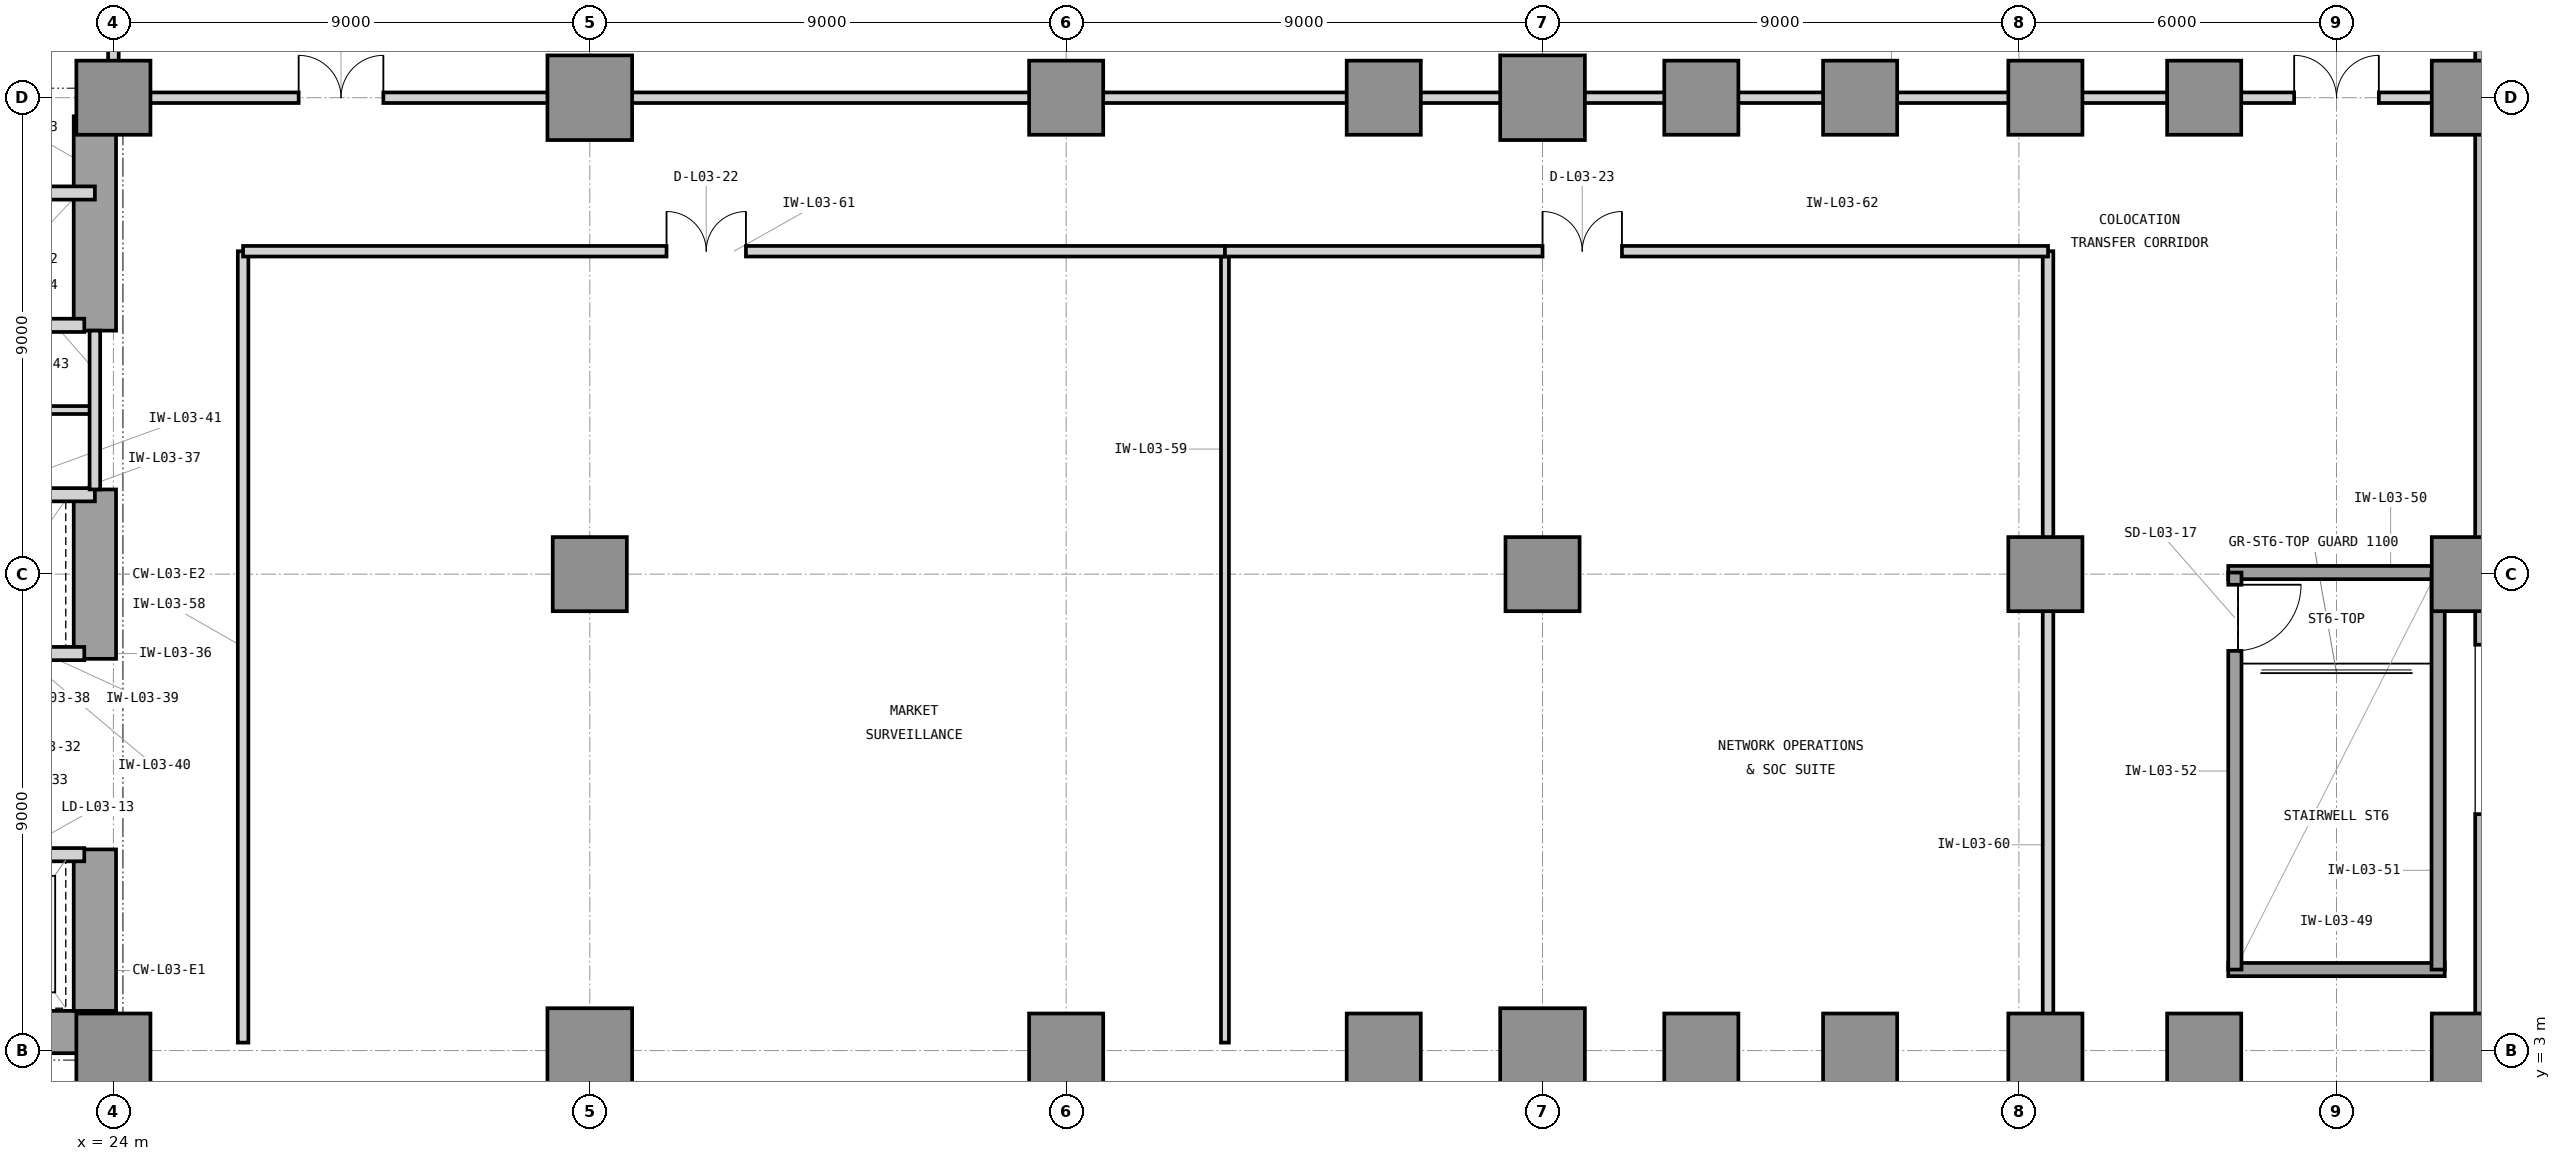
"""IFC4 building model, lengths in metres.
Left out: names, types, materials, properties, quantities, classifications, styles, units other than length and angle.
Written with IfcOpenShell. Run it as: python <this file> out.ifc"""

import sys

from ifc_helpers import new_model, si_unit, direction, frame, frame_2d, origin, origin_2d, place, context, subcontext, project, spatial, rectangle, extrude, element, fill, save


model = new_model("IFC4")
c1 = context("Model", 3, precision=1e-05, world=origin(), true_north=direction((0.0, 1.0)))
c2 = subcontext(c1, "Body", "Model", "MODEL_VIEW")
j1 = project(units=[si_unit("LENGTHUNIT", "METRE"), si_unit("PLANEANGLEUNIT", "RADIAN")], contexts=[c1])
p1 = place(None, origin())
s1 = spatial("IfcSite", under=j1, at=p1, CompositionType="ELEMENT")
p2 = place(p1, origin())
s2 = spatial("IfcBuilding", under=s1, at=p2, CompositionType="ELEMENT")
p3 = place(p2, frame((0.0, 0.0, 16.2)))
s3 = spatial("IfcBuildingStorey", under=s2, at=p3, CompositionType="ELEMENT", Elevation=16.2)
p4 = place(p3, frame((7.475, 3.35, 0.0), z_axis=(0.0, 0.0, 1.0), x_axis=(1.0, 0.0, 0.0)))
e1 = element("IfcWall", 1, at=p4, inside=s3, PredefinedType="SHEAR", context=c2, shape_type="SweptSolid", body=[
    extrude(rectangle(XDim=16.575, YDim=0.8, at=frame_2d((8.288, 0.0))), origin(), (0.0, 0.0, 1.0), 5.4),
])
p5 = place(p3, frame((23.65, 3.75, 0.0), z_axis=(0.0, 0.0, 1.0), x_axis=(0.0, 1.0, 0.0)))
e2 = element("IfcWall", 2, at=p5, inside=s3, PredefinedType="SHEAR", context=c2, shape_type="SweptSolid", body=[
    extrude(rectangle(XDim=3.05, YDim=0.8, at=frame_2d((1.525, 0.0))), origin(), (0.0, 0.0, 1.0), 5.4),
])
p6 = place(p3, frame((23.65, 10.4, 0.0), z_axis=(0.0, 0.0, 1.0), x_axis=(0.0, 1.0, 0.0)))
e3 = element("IfcWall", 3, at=p6, inside=s3, PredefinedType="SHEAR", context=c2, shape_type="SweptSolid", body=[
    extrude(rectangle(XDim=3.2, YDim=0.8, at=frame_2d((1.6, 0.0))), origin(), (0.0, 0.0, 1.0), 5.4),
])
p7 = place(p3, frame((23.65, 16.6, 0.0), z_axis=(0.0, 0.0, 1.0), x_axis=(0.0, 1.0, 0.0)))
e4 = element("IfcWall", 4, at=p7, inside=s3, PredefinedType="SHEAR", context=c2, shape_type="SweptSolid", body=[
    extrude(rectangle(XDim=4.05, YDim=0.8, at=frame_2d((2.025, 0.0))), origin(), (0.0, 0.0, 1.0), 5.4),
])
for number, where, z_axis, x_axis in (
    (5, (24.0, 3.0, -0.6), (0.0, 0.0, 1.0), (1.0, 0.0, 0.0)),
    (6, (24.0, 21.0, -0.6), (0.0, 0.0, 1.0), (1.0, 0.0, 0.0)),
):
    element("IfcColumn", number, at=place(p3, frame(where, z_axis=z_axis, x_axis=x_axis)), inside=s3, PredefinedType="COLUMN", context=c2, shape_type="SweptSolid", body=[
        extrude(rectangle(XDim=1.4, YDim=1.4, at=origin_2d()), origin(), (0.0, 0.0, 1.0), 6.0),
    ])
p8 = place(p3, frame((33.0, 3.0, -0.6), z_axis=(0.0, 0.0, 1.0), x_axis=(1.0, 0.0, 0.0)))
e7 = element("IfcColumn", 7, at=p8, inside=s3, PredefinedType="COLUMN", context=c2, shape_type="SweptSolid", body=[
    extrude(rectangle(XDim=1.6, YDim=1.6, at=origin_2d()), origin(), (0.0, 0.0, 1.0), 6.0),
])
p9 = place(p3, frame((33.0, 12.0, -0.6), z_axis=(0.0, 0.0, 1.0), x_axis=(1.0, 0.0, 0.0)))
e8 = element("IfcColumn", 8, at=p9, inside=s3, PredefinedType="COLUMN", context=c2, shape_type="SweptSolid", body=[
    extrude(rectangle(XDim=1.4, YDim=1.4, at=origin_2d()), origin(), (0.0, 0.0, 1.0), 6.0),
])
p10 = place(p3, frame((33.0, 21.0, -0.6), z_axis=(0.0, 0.0, 1.0), x_axis=(1.0, 0.0, 0.0)))
e9 = element("IfcColumn", 9, at=p10, inside=s3, PredefinedType="COLUMN", context=c2, shape_type="SweptSolid", body=[
    extrude(rectangle(XDim=1.6, YDim=1.6, at=origin_2d()), origin(), (0.0, 0.0, 1.0), 6.0),
])
for number, where, z_axis, x_axis in (
    (10, (42.0, 3.0, -0.6), (0.0, 0.0, 1.0), (1.0, 0.0, 0.0)),
    (11, (42.0, 21.0, -0.6), (0.0, 0.0, 1.0), (1.0, 0.0, 0.0)),
):
    element("IfcColumn", number, at=place(p3, frame(where, z_axis=z_axis, x_axis=x_axis)), inside=s3, PredefinedType="COLUMN", context=c2, shape_type="SweptSolid", body=[
        extrude(rectangle(XDim=1.4, YDim=1.4, at=origin_2d()), origin(), (0.0, 0.0, 1.0), 6.0),
    ])
p11 = place(p3, frame((51.0, 3.0, -0.6), z_axis=(0.0, 0.0, 1.0), x_axis=(1.0, 0.0, 0.0)))
e12 = element("IfcColumn", 12, at=p11, inside=s3, PredefinedType="COLUMN", context=c2, shape_type="SweptSolid", body=[
    extrude(rectangle(XDim=1.6, YDim=1.6, at=origin_2d()), origin(), (0.0, 0.0, 1.0), 6.0),
])
p12 = place(p3, frame((51.0, 12.0, -0.6), z_axis=(0.0, 0.0, 1.0), x_axis=(1.0, 0.0, 0.0)))
e13 = element("IfcColumn", 13, at=p12, inside=s3, PredefinedType="COLUMN", context=c2, shape_type="SweptSolid", body=[
    extrude(rectangle(XDim=1.4, YDim=1.4, at=origin_2d()), origin(), (0.0, 0.0, 1.0), 6.0),
])
p13 = place(p3, frame((51.0, 21.0, -0.6), z_axis=(0.0, 0.0, 1.0), x_axis=(1.0, 0.0, 0.0)))
e14 = element("IfcColumn", 14, at=p13, inside=s3, PredefinedType="COLUMN", context=c2, shape_type="SweptSolid", body=[
    extrude(rectangle(XDim=1.6, YDim=1.6, at=origin_2d()), origin(), (0.0, 0.0, 1.0), 6.0),
])
for number, where, z_axis, x_axis in (
    (15, (60.5, 3.0, -0.6), (0.0, 0.0, 1.0), (1.0, 0.0, 0.0)),
    (16, (60.5, 12.0, -0.6), (0.0, 0.0, 1.0), (1.0, 0.0, 0.0)),
    (17, (60.5, 21.0, -0.6), (0.0, 0.0, 1.0), (1.0, 0.0, 0.0)),
    (18, (68.5, 3.0, -0.6), (0.0, 0.0, 1.0), (1.0, 0.0, 0.0)),
    (19, (68.5, 12.0, -0.6), (0.0, 0.0, 1.0), (1.0, 0.0, 0.0)),
    (20, (68.5, 21.0, -0.6), (0.0, 0.0, 1.0), (1.0, 0.0, 0.0)),
    (21, (48.0, 3.0, -0.6), (0.0, 0.0, 1.0), (1.0, 0.0, 0.0)),
    (22, (48.0, 21.0, -0.6), (0.0, 0.0, 1.0), (1.0, 0.0, 0.0)),
    (23, (54.0, 3.0, -0.6), (0.0, 0.0, 1.0), (1.0, 0.0, 0.0)),
    (24, (54.0, 21.0, -0.6), (0.0, 0.0, 1.0), (1.0, 0.0, 0.0)),
    (25, (57.0, 3.0, -0.6), (0.0, 0.0, 1.0), (1.0, 0.0, 0.0)),
    (26, (57.0, 21.0, -0.6), (0.0, 0.0, 1.0), (1.0, 0.0, 0.0)),
    (27, (63.5, 3.0, -0.6), (0.0, 0.0, 1.0), (1.0, 0.0, 0.0)),
    (28, (63.5, 21.0, -0.6), (0.0, 0.0, 1.0), (1.0, 0.0, 0.0)),
):
    element("IfcColumn", number, at=place(p3, frame(where, z_axis=z_axis, x_axis=x_axis)), inside=s3, PredefinedType="COLUMN", context=c2, shape_type="SweptSolid", body=[
        extrude(rectangle(XDim=1.4, YDim=1.4, at=origin_2d()), origin(), (0.0, 0.0, 1.0), 6.0),
    ])
p14 = place(p3, frame((68.81, 1.6, 0.0), z_axis=(0.0, 0.0, 1.0), x_axis=(0.0, 1.0, 0.0)))
e29 = element("IfcWall", 29, at=p14, inside=s3, PredefinedType="STANDARD", context=c2, shape_type="SweptSolid", body=[
    extrude(rectangle(XDim=44.8, YDim=0.38, at=frame_2d((22.4, 0.0))), origin(), (0.0, 0.0, 1.0), 5.18),
])
p15 = place(p14, frame((5.867, 0.0, 0.9)))
e30 = element("IfcOpeningElement", 30, at=p15, cuts=e29, PredefinedType="OPENING", context=c2, shape_type="SweptSolid", body=[
    extrude(rectangle(XDim=3.2, YDim=3.1, at=frame_2d((1.6, 1.55))), frame((0.0, 0.2, 0.0), z_axis=(0.0, -1.0, 0.0), x_axis=(1.0, 0.0, 0.0)), (0.0, 0.0, 1.0), 0.4),
])
p16 = place(p3, frame((21.05, 16.7, 0.0), z_axis=(0.0, 0.0, 1.0), x_axis=(1.0, 0.0, 0.0)))
e31 = element("IfcWall", 31, at=p16, inside=s3, PredefinedType="PARTITIONING", context=c2, shape_type="SweptSolid", body=[
    extrude(rectangle(XDim=2.4, YDim=0.25, at=frame_2d((1.2, 0.0))), origin(), (0.0, 0.0, 1.0), 4.626),
])
p17 = place(p3, frame((16.45, 19.2, 0.0), z_axis=(0.0, 0.0, 1.0), x_axis=(1.0, 0.0, 0.0)))
e32 = element("IfcWall", 32, at=p17, inside=s3, PredefinedType="PARTITIONING", context=c2, shape_type="SweptSolid", body=[
    extrude(rectangle(XDim=7.2, YDim=0.25, at=frame_2d((3.6, 0.0))), origin(), (0.0, 0.0, 1.0), 5.13),
])
p18 = place(p3, frame((21.05, 6.7, 0.0), z_axis=(0.0, 0.0, 1.0), x_axis=(1.0, 0.0, 0.0)))
e33 = element("IfcWall", 33, at=p18, inside=s3, PredefinedType="PARTITIONING", context=c2, shape_type="SweptSolid", body=[
    extrude(rectangle(XDim=2.4, YDim=0.25, at=frame_2d((1.2, 0.0))), origin(), (0.0, 0.0, 1.0), 4.626),
])
p19 = place(p18, frame((0.48, 0.0, 0.0)))
e34 = element("IfcOpeningElement", 34, at=p19, cuts=e33, PredefinedType="OPENING", context=c2, shape_type="SweptSolid", body=[
    extrude(rectangle(XDim=1.15, YDim=2.25, at=frame_2d((0.575, 1.125))), frame((0.0, 0.135, 0.0), z_axis=(0.0, -1.0, 0.0), x_axis=(1.0, 0.0, 0.0)), (0.0, 0.0, 1.0), 0.27),
])
p20 = place(p3, frame((21.05, 10.5, 0.0), z_axis=(0.0, 0.0, 1.0), x_axis=(1.0, 0.0, 0.0)))
e35 = element("IfcWall", 35, at=p20, inside=s3, PredefinedType="PARTITIONING", context=c2, shape_type="SweptSolid", body=[
    extrude(rectangle(XDim=2.4, YDim=0.25, at=frame_2d((1.2, 0.0))), origin(), (0.0, 0.0, 1.0), 4.626),
])
p21 = place(p3, frame((14.7, 13.5, 0.0), z_axis=(0.0, 0.0, 1.0), x_axis=(1.0, 0.0, 0.0)))
e36 = element("IfcWall", 36, at=p21, inside=s3, PredefinedType="PARTITIONING", context=c2, shape_type="SweptSolid", body=[
    extrude(rectangle(XDim=8.95, YDim=0.25, at=frame_2d((4.475, 0.0))), origin(), (0.0, 0.0, 1.0), 4.626),
])
p22 = place(p3, frame((16.6, 15.1, 0.0), z_axis=(0.0, 0.0, 1.0), x_axis=(1.0, 0.0, 0.0)))
e37 = element("IfcWall", 37, at=p22, inside=s3, PredefinedType="PARTITIONING", context=c2, shape_type="SweptSolid", body=[
    extrude(rectangle(XDim=7.05, YDim=0.15, at=frame_2d((3.525, 0.0))), origin(), (0.0, 0.0, 1.0), 5.13),
])
p23 = place(p3, frame((23.65, 13.6, 0.0), z_axis=(0.0, 0.0, 1.0), x_axis=(0.0, 1.0, 0.0)))
e38 = element("IfcWall", 38, at=p23, inside=s3, PredefinedType="PARTITIONING", context=c2, shape_type="SweptSolid", body=[
    extrude(rectangle(XDim=3.0, YDim=0.2, at=frame_2d((1.5, 0.0))), origin(), (0.0, 0.0, 1.0), 5.13),
])
for number, where, z_axis, x_axis in (
    (39, (63.955, 4.53, 0.0), (0.0, 0.0, 1.0), (1.0, 0.0, 0.0)),
    (40, (63.955, 12.03, 0.0), (0.0, 0.0, 1.0), (1.0, 0.0, 0.0)),
):
    element("IfcWall", number, at=place(p3, frame(where, z_axis=z_axis, x_axis=x_axis)), inside=s3, PredefinedType="SHEAR", context=c2, shape_type="SweptSolid", body=[
        extrude(rectangle(XDim=4.09, YDim=0.25, at=frame_2d((2.045, 0.0))), origin(), (0.0, 0.0, 1.0), 5.4),
    ])
p24 = place(p3, frame((67.92, 4.53, 0.0), z_axis=(0.0, 0.0, 1.0), x_axis=(0.0, 1.0, 0.0)))
e41 = element("IfcWall", 41, at=p24, inside=s3, PredefinedType="SHEAR", context=c2, shape_type="SweptSolid", body=[
    extrude(rectangle(XDim=7.5, YDim=0.25, at=frame_2d((3.75, 0.0))), origin(), (0.0, 0.0, 1.0), 5.4),
])
p25 = place(p3, frame((64.08, 4.53, 0.0), z_axis=(0.0, 0.0, 1.0), x_axis=(0.0, 1.0, 0.0)))
e42 = element("IfcWall", 42, at=p25, inside=s3, PredefinedType="SHEAR", context=c2, shape_type="SweptSolid", body=[
    extrude(rectangle(XDim=7.5, YDim=0.25, at=frame_2d((3.75, 0.0))), origin(), (0.0, 0.0, 1.0), 5.4),
])
p26 = place(p25, frame((6.02, 0.0, 0.0)))
e43 = element("IfcOpeningElement", 43, at=p26, cuts=e42, PredefinedType="OPENING", context=c2, shape_type="SweptSolid", body=[
    extrude(rectangle(XDim=1.25, YDim=2.2, at=frame_2d((0.625, 1.1))), frame((0.0, 0.135, 0.0), z_axis=(0.0, -1.0, 0.0), x_axis=(1.0, 0.0, 0.0)), (0.0, 0.0, 1.0), 0.27),
])
p27 = place(p3, frame((24.0, 21.0, 0.0), z_axis=(0.0, 0.0, 1.0), x_axis=(1.0, 0.0, 0.0)))
e44 = element("IfcWall", 44, at=p27, inside=s3, PredefinedType="PARTITIONING", context=c2, shape_type="SweptSolid", body=[
    extrude(rectangle(XDim=44.79, YDim=0.2, at=frame_2d((22.395, 0.0))), origin(), (0.0, 0.0, 1.0), 4.434),
])
p28 = place(p27, frame((3.5, 0.0, 0.0)))
e45 = element("IfcOpeningElement", 45, at=p28, cuts=e44, PredefinedType="OPENING", context=c2, shape_type="SweptSolid", body=[
    extrude(rectangle(XDim=1.6, YDim=2.3, at=frame_2d((0.8, 1.15))), frame((0.0, 0.11, 0.0), z_axis=(0.0, -1.0, 0.0), x_axis=(1.0, 0.0, 0.0)), (0.0, 0.0, 1.0), 0.22),
])
p29 = place(p27, frame((41.2, 0.0, 0.0)))
e46 = element("IfcOpeningElement", 46, at=p29, cuts=e44, PredefinedType="OPENING", context=c2, shape_type="SweptSolid", body=[
    extrude(rectangle(XDim=1.6, YDim=2.3, at=frame_2d((0.8, 1.15))), frame((0.0, 0.11, 0.0), z_axis=(0.0, -1.0, 0.0), x_axis=(1.0, 0.0, 0.0)), (0.0, 0.0, 1.0), 0.22),
])
p30 = place(p3, frame((24.0, 21.0, 0.0), z_axis=(0.0, 0.0, 1.0), x_axis=(0.0, 1.0, 0.0)))
e47 = element("IfcWall", 47, at=p30, inside=s3, PredefinedType="PARTITIONING", context=c2, shape_type="SweptSolid", body=[
    extrude(rectangle(XDim=26.58, YDim=0.2, at=frame_2d((13.29, 0.0))), origin(), (0.0, 0.0, 1.0), 4.434),
])
p31 = place(p3, frame((26.45, 3.15, 0.0), z_axis=(0.0, 0.0, 1.0), x_axis=(0.0, 1.0, 0.0)))
e48 = element("IfcWall", 48, at=p31, inside=s3, PredefinedType="PARTITIONING", context=c2, shape_type="SweptSolid", body=[
    extrude(rectangle(XDim=14.95, YDim=0.2, at=frame_2d((7.475, 0.0))), origin(), (0.0, 0.0, 1.0), 5.13),
])
p32 = place(p3, frame((45.0, 3.15, 0.0), z_axis=(0.0, 0.0, 1.0), x_axis=(0.0, 1.0, 0.0)))
e49 = element("IfcWall", 49, at=p32, inside=s3, PredefinedType="PARTITIONING", context=c2, shape_type="SweptSolid", body=[
    extrude(rectangle(XDim=14.95, YDim=0.15, at=frame_2d((7.475, 0.0))), origin(), (0.0, 0.0, 1.0), 5.13),
])
p33 = place(p3, frame((60.55, 3.15, 0.0), z_axis=(0.0, 0.0, 1.0), x_axis=(0.0, 1.0, 0.0)))
e50 = element("IfcWall", 50, at=p33, inside=s3, PredefinedType="PARTITIONING", context=c2, shape_type="SweptSolid", body=[
    extrude(rectangle(XDim=14.95, YDim=0.2, at=frame_2d((7.475, 0.0))), origin(), (0.0, 0.0, 1.0), 4.314),
])
p34 = place(p3, frame((26.45, 18.1, 0.0), z_axis=(0.0, 0.0, 1.0), x_axis=(1.0, 0.0, 0.0)))
e51 = element("IfcWall", 51, at=p34, inside=s3, PredefinedType="PARTITIONING", context=c2, shape_type="SweptSolid", body=[
    extrude(rectangle(XDim=18.55, YDim=0.2, at=frame_2d((9.275, 0.0))), origin(), (0.0, 0.0, 1.0), 4.626),
])
p35 = place(p34, frame((8.0, 0.0, 0.0)))
e52 = element("IfcOpeningElement", 52, at=p35, cuts=e51, PredefinedType="OPENING", context=c2, shape_type="SweptSolid", body=[
    extrude(rectangle(XDim=1.5, YDim=2.3, at=frame_2d((0.75, 1.15))), frame((0.0, 0.11, 0.0), z_axis=(0.0, -1.0, 0.0), x_axis=(1.0, 0.0, 0.0)), (0.0, 0.0, 1.0), 0.22),
])
p36 = place(p3, frame((45.0, 18.1, 0.0), z_axis=(0.0, 0.0, 1.0), x_axis=(1.0, 0.0, 0.0)))
e53 = element("IfcWall", 53, at=p36, inside=s3, PredefinedType="PARTITIONING", context=c2, shape_type="SweptSolid", body=[
    extrude(rectangle(XDim=15.55, YDim=0.2, at=frame_2d((7.775, 0.0))), origin(), (0.0, 0.0, 1.0), 4.626),
])
p37 = place(p36, frame((6.0, 0.0, 0.0)))
e54 = element("IfcOpeningElement", 54, at=p37, cuts=e53, PredefinedType="OPENING", context=c2, shape_type="SweptSolid", body=[
    extrude(rectangle(XDim=1.5, YDim=2.3, at=frame_2d((0.75, 1.15))), frame((0.0, 0.11, 0.0), z_axis=(0.0, -1.0, 0.0), x_axis=(1.0, 0.0, 0.0)), (0.0, 0.0, 1.0), 0.22),
])
p38 = place(p15, origin())
e55 = element("IfcWindow", 55, at=p38, inside=s3, PartitioningType="SINGLE_PANEL", PredefinedType="WINDOW", context=c2, shape_type="SweptSolid", body=[
    extrude(rectangle(XDim=3.2, YDim=3.1, at=frame_2d((1.6, 1.55))), frame((0.0, 0.11, 0.0), z_axis=(0.0, -1.0, 0.0), x_axis=(1.0, 0.0, 0.0)), (0.0, 0.0, 1.0), 0.06),
])
fill(e30, e55)
p39 = place(p26, frame((1.25, 0.0, 0.0), z_axis=(0.0, 0.0, 1.0), x_axis=(-1.0, 0.0, 0.0)))
e56 = element("IfcDoor", 56, at=p39, inside=s3, OperationType="SINGLE_SWING_LEFT", PredefinedType="DOOR", context=c2, shape_type="SweptSolid", body=[
    extrude(rectangle(XDim=1.25, YDim=2.2, at=frame_2d((0.625, 1.1))), frame((0.0, 0.025, 0.0), z_axis=(0.0, -1.0, 0.0), x_axis=(1.0, 0.0, 0.0)), (0.0, 0.0, 1.0), 0.05),
])
fill(e43, e56)
p40 = place(p28, origin())
e57 = element("IfcDoor", 57, at=p40, inside=s3, OperationType="DOUBLE_DOOR_SINGLE_SWING", PredefinedType="DOOR", context=c2, shape_type="SweptSolid", body=[
    extrude(rectangle(XDim=1.6, YDim=2.3, at=frame_2d((0.8, 1.15))), frame((0.0, 0.025, 0.0), z_axis=(0.0, -1.0, 0.0), x_axis=(1.0, 0.0, 0.0)), (0.0, 0.0, 1.0), 0.05),
])
fill(e45, e57)
p41 = place(p29, origin())
e58 = element("IfcDoor", 58, at=p41, inside=s3, OperationType="DOUBLE_DOOR_SINGLE_SWING", PredefinedType="DOOR", context=c2, shape_type="SweptSolid", body=[
    extrude(rectangle(XDim=1.6, YDim=2.3, at=frame_2d((0.8, 1.15))), frame((0.0, 0.025, 0.0), z_axis=(0.0, -1.0, 0.0), x_axis=(1.0, 0.0, 0.0)), (0.0, 0.0, 1.0), 0.05),
])
fill(e46, e58)
p42 = place(p35, origin())
e59 = element("IfcDoor", 59, at=p42, inside=s3, OperationType="DOUBLE_DOOR_SINGLE_SWING", PredefinedType="DOOR", context=c2, shape_type="SweptSolid", body=[
    extrude(rectangle(XDim=1.5, YDim=2.3, at=frame_2d((0.75, 1.15))), frame((0.0, 0.025, 0.0), z_axis=(0.0, -1.0, 0.0), x_axis=(1.0, 0.0, 0.0)), (0.0, 0.0, 1.0), 0.05),
])
fill(e52, e59)
p43 = place(p37, origin())
e60 = element("IfcDoor", 60, at=p43, inside=s3, OperationType="DOUBLE_DOOR_SINGLE_SWING", PredefinedType="DOOR", context=c2, shape_type="SweptSolid", body=[
    extrude(rectangle(XDim=1.5, YDim=2.3, at=frame_2d((0.75, 1.15))), frame((0.0, 0.025, 0.0), z_axis=(0.0, -1.0, 0.0), x_axis=(1.0, 0.0, 0.0)), (0.0, 0.0, 1.0), 0.05),
])
fill(e54, e60)
save(model, sys.argv[1])
